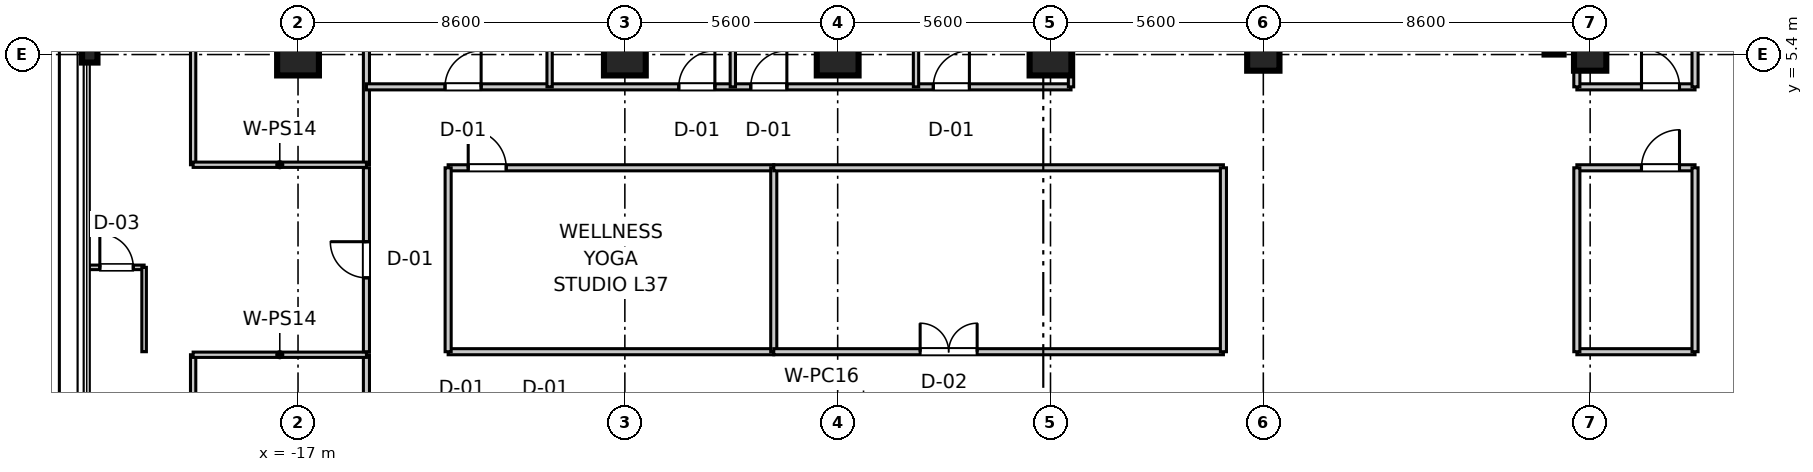
"""IFC4 building model, lengths in metres.
Left out: names, types, materials, properties, quantities, classifications, styles, units other than length and angle.
Written with IfcOpenShell. Run it as: python <this file> out.ifc"""

import sys

from ifc_helpers import new_model, si_unit, direction, frame, frame_2d, origin, origin_2d, place, context, subcontext, project, spatial, rectangle, i_section, extrude, source, transform, mapped, element, fill, save


model = new_model("IFC4")
c1 = context("Model", 3, precision=1e-05, world=origin(), true_north=direction((0.0, 1.0)))
c2 = subcontext(c1, "Body", "Model", "MODEL_VIEW")
j1 = project(units=[si_unit("LENGTHUNIT", "METRE"), si_unit("PLANEANGLEUNIT", "RADIAN")], contexts=[c1])
p1 = place(None, origin())
s1 = spatial("IfcSite", under=j1, at=p1, CompositionType="ELEMENT")
p2 = place(p1, origin())
s2 = spatial("IfcBuilding", under=s1, at=p2, CompositionType="ELEMENT")
p3 = place(p2, frame((0.0, 0.0, 149.0)))
s3 = spatial("IfcBuildingStorey", under=s2, at=p3, CompositionType="ELEMENT", Elevation=149.0)
m1 = source(origin(), c2, "Body", "SweptSolid", [
    extrude(rectangle(XDim=1.1, YDim=1.1, at=origin_2d()), origin(), (0.0, 0.0, 1.0), 3.605),
])
for number, where, z_axis, x_axis in (
    (1, (-17.0, 5.4, 0.0), (0.0, 0.0, 1.0), (1.0, 0.0, 0.0)),
    (2, (-8.4, 5.4, 0.0), (0.0, 0.0, 1.0), (1.0, 0.0, 0.0)),
    (3, (-2.8, 5.4, 0.0), (0.0, 0.0, 1.0), (1.0, 0.0, 0.0)),
    (4, (2.8, 5.4, 0.0), (0.0, 0.0, 1.0), (1.0, 0.0, 0.0)),
):
    element("IfcColumn", number, at=place(p3, frame(where, z_axis=z_axis, x_axis=x_axis)), inside=s3, PredefinedType="COLUMN", context=c2, shape_type="MappedRepresentation", body=[
        mapped(m1, transform((0.0, 0.0, 0.0), scale=1.0)),
    ])
m2 = source(origin(), c2, "Body", "SweptSolid", [
    extrude(rectangle(XDim=0.85, YDim=0.85, at=origin_2d()), origin(), (0.0, 0.0, 1.0), 3.605),
])
for number, where, z_axis, x_axis in (
    (5, (8.4, 5.4, 0.0), (0.0, 0.0, 1.0), (1.0, 0.0, 0.0)),
    (6, (17.0, 5.4, 0.0), (0.0, 0.0, 1.0), (1.0, 0.0, 0.0)),
):
    element("IfcColumn", number, at=place(p3, frame(where, z_axis=z_axis, x_axis=x_axis)), inside=s3, PredefinedType="PILASTER", context=c2, shape_type="MappedRepresentation", body=[
        mapped(m2, transform((0.0, 0.0, 0.0), scale=1.0)),
    ])
m3 = source(origin(), c2, "Body", "SweptSolid", [
    extrude(i_section(OverallWidth=0.406, OverallDepth=0.422, WebThickness=0.019, FlangeThickness=0.03, at=origin_2d()), origin(), (0.0, 0.0, 1.0), 3.605),
])
p4 = place(p3, frame((-22.48, 5.4, 0.0), z_axis=(0.0, 0.0, 1.0), x_axis=(1.0, 0.0, 0.0)))
e7 = element("IfcColumn", 7, at=p4, inside=s3, PredefinedType="COLUMN", context=c2, shape_type="MappedRepresentation", body=[
    mapped(m3, transform((0.0, 0.0, 0.0), scale=1.0)),
])
m4 = source(origin(), c2, "Body", "SweptSolid", [
    extrude(rectangle(XDim=11.6, YDim=0.5, at=frame_2d((5.8, 0.0))), origin(), (0.0, 0.0, 1.0), 3.39),
])
p5 = place(p3, frame((16.05, 5.4, 0.0), z_axis=(0.0, 0.0, 1.0), x_axis=(0.0, 1.0, 0.0)))
e8 = element("IfcWall", 8, at=p5, inside=s3, PredefinedType="SHEAR", context=c2, shape_type="MappedRepresentation", body=[
    mapped(m4, transform((0.0, 0.0, 0.0), scale=1.0)),
])
m5 = source(origin(), c2, "Body", "SweptSolid", [
    extrude(rectangle(XDim=3.11, YDim=0.16, at=frame_2d((1.555, 0.0))), origin(), (0.0, 0.0, 1.0), 2.73),
])
p6 = place(p3, frame((16.65, 4.55, 0.0), z_axis=(0.0, 0.0, 1.0), x_axis=(1.0, 0.0, 0.0)))
e9 = element("IfcWall", 9, at=p6, inside=s3, PredefinedType="PARTITIONING", context=c2, shape_type="MappedRepresentation", body=[
    mapped(m5, transform((0.0, 0.0, 0.0), scale=1.0)),
])
p7 = place(p6, frame((1.701, 0.0, 0.0)))
e10 = element("IfcOpeningElement", 10, at=p7, cuts=e9, PredefinedType="OPENING", context=c2, shape_type="SweptSolid", body=[
    extrude(rectangle(XDim=1.0, YDim=2.1, at=frame_2d((0.5, 1.05))), frame((0.0, 0.09, 0.0), z_axis=(0.0, -1.0, 0.0), x_axis=(1.0, 0.0, 0.0)), (0.0, 0.0, 1.0), 0.18),
])
m6 = source(origin(), c2, "Body", "SweptSolid", [
    extrude(rectangle(XDim=17.95, YDim=0.16, at=frame_2d((8.975, 0.0))), origin(), (0.0, 0.0, 1.0), 2.73),
])
p8 = place(p3, frame((16.65, 4.55, 0.0), z_axis=(0.0, 0.0, 1.0), x_axis=(0.0, 1.0, 0.0)))
e11 = element("IfcWall", 11, at=p8, inside=s3, PredefinedType="PARTITIONING", context=c2, shape_type="MappedRepresentation", body=[
    mapped(m6, transform((0.0, 0.0, 0.0), scale=1.0)),
])
m7 = source(origin(), c2, "Body", "SweptSolid", [
    extrude(rectangle(XDim=16.53, YDim=0.16, at=frame_2d((8.265, 0.0))), origin(), (0.0, 0.0, 1.0), 2.73),
])
p9 = place(p3, frame((19.76, 4.55, 0.0), z_axis=(0.0, 0.0, 1.0), x_axis=(0.0, 1.0, 0.0)))
e12 = element("IfcWall", 12, at=p9, inside=s3, PredefinedType="PARTITIONING", context=c2, shape_type="MappedRepresentation", body=[
    mapped(m7, transform((0.0, 0.0, 0.0), scale=1.0)),
])
m8 = source(origin(), c2, "Body", "SweptSolid", [
    extrude(rectangle(XDim=20.0, YDim=0.16, at=frame_2d((10.0, 0.0))), origin(), (0.0, 0.0, 1.0), 2.73),
])
p10 = place(p3, frame((-15.2, 2.5, 0.0), z_axis=(0.0, 0.0, 1.0), x_axis=(0.0, 1.0, 0.0)))
e13 = element("IfcWall", 13, at=p10, inside=s3, PredefinedType="PARTITIONING", context=c2, shape_type="MappedRepresentation", body=[
    mapped(m8, transform((0.0, 0.0, 0.0), scale=1.0)),
])
p11 = place(p10, frame((8.265, 0.0, 0.0)))
e14 = element("IfcOpeningElement", 14, at=p11, cuts=e13, PredefinedType="OPENING", context=c2, shape_type="SweptSolid", body=[
    extrude(rectangle(XDim=0.95, YDim=2.1, at=frame_2d((0.475, 1.05))), frame((0.0, 0.09, 0.0), z_axis=(0.0, -1.0, 0.0), x_axis=(1.0, 0.0, 0.0)), (0.0, 0.0, 1.0), 0.18),
])
m9 = source(origin(), c2, "Body", "SweptSolid", [
    extrude(rectangle(XDim=18.58, YDim=0.14, at=frame_2d((9.29, 0.0))), origin(), (0.0, 0.0, 1.0), 2.73),
])
p12 = place(p3, frame((-19.76, 2.5, 0.0), z_axis=(0.0, 0.0, 1.0), x_axis=(0.0, 1.0, 0.0)))
e15 = element("IfcWall", 15, at=p12, inside=s3, PredefinedType="PARTITIONING", context=c2, shape_type="MappedRepresentation", body=[
    mapped(m9, transform((0.0, 0.0, 0.0), scale=1.0)),
])
m10 = source(origin(), c2, "Body", "SweptSolid", [
    extrude(rectangle(XDim=4.56, YDim=0.14, at=frame_2d((2.28, 0.0))), origin(), (0.0, 0.0, 1.0), 2.73),
])
p13 = place(p3, frame((-19.76, 2.5, 0.0), z_axis=(0.0, 0.0, 1.0), x_axis=(1.0, 0.0, 0.0)))
e16 = element("IfcWall", 16, at=p13, inside=s3, PredefinedType="PARTITIONING", context=c2, shape_type="MappedRepresentation", body=[
    mapped(m10, transform((0.0, 0.0, 0.0), scale=1.0)),
])
m11 = source(origin(), c2, "Body", "SweptSolid", [
    extrude(rectangle(XDim=18.54, YDim=0.16, at=frame_2d((9.27, 0.0))), origin(), (0.0, 0.0, 1.0), 2.73),
])
p14 = place(p3, frame((-15.2, 4.55, 0.0), z_axis=(0.0, 0.0, 1.0), x_axis=(1.0, 0.0, 0.0)))
e17 = element("IfcWall", 17, at=p14, inside=s3, PredefinedType="PARTITIONING", context=c2, shape_type="MappedRepresentation", body=[
    mapped(m11, transform((0.0, 0.0, 0.0), scale=1.0)),
])
p15 = place(p14, frame((2.068, 0.0, 0.0)))
e18 = element("IfcOpeningElement", 18, at=p15, cuts=e17, PredefinedType="OPENING", context=c2, shape_type="SweptSolid", body=[
    extrude(rectangle(XDim=0.95, YDim=2.1, at=frame_2d((0.475, 1.05))), frame((0.0, 0.09, 0.0), z_axis=(0.0, -1.0, 0.0), x_axis=(1.0, 0.0, 0.0)), (0.0, 0.0, 1.0), 0.18),
])
p16 = place(p14, frame((8.219, 0.0, 0.0)))
e19 = element("IfcOpeningElement", 19, at=p16, cuts=e17, PredefinedType="OPENING", context=c2, shape_type="SweptSolid", body=[
    extrude(rectangle(XDim=0.95, YDim=2.1, at=frame_2d((0.475, 1.05))), frame((0.0, 0.09, 0.0), z_axis=(0.0, -1.0, 0.0), x_axis=(1.0, 0.0, 0.0)), (0.0, 0.0, 1.0), 0.18),
])
p17 = place(p14, frame((10.113, 0.0, 0.0)))
e20 = element("IfcOpeningElement", 20, at=p17, cuts=e17, PredefinedType="OPENING", context=c2, shape_type="SweptSolid", body=[
    extrude(rectangle(XDim=0.95, YDim=2.1, at=frame_2d((0.475, 1.05))), frame((0.0, 0.09, 0.0), z_axis=(0.0, -1.0, 0.0), x_axis=(1.0, 0.0, 0.0)), (0.0, 0.0, 1.0), 0.18),
])
p18 = place(p14, frame((14.916, 0.0, 0.0)))
e21 = element("IfcOpeningElement", 21, at=p18, cuts=e17, PredefinedType="OPENING", context=c2, shape_type="SweptSolid", body=[
    extrude(rectangle(XDim=0.95, YDim=2.1, at=frame_2d((0.475, 1.05))), frame((0.0, 0.09, 0.0), z_axis=(0.0, -1.0, 0.0), x_axis=(1.0, 0.0, 0.0)), (0.0, 0.0, 1.0), 0.18),
])
m12 = source(origin(), c2, "Body", "SweptSolid", [
    extrude(rectangle(XDim=17.95, YDim=0.14, at=frame_2d((8.975, 0.0))), origin(), (0.0, 0.0, 1.0), 2.73),
])
for number, where, z_axis, x_axis in (
    (22, (3.34, 4.55, 0.0), (0.0, 0.0, 1.0), (0.0, 1.0, 0.0)),
    (23, (-10.38, 4.55, 0.0), (0.0, 0.0, 1.0), (0.0, 1.0, 0.0)),
    (24, (-5.559, 4.55, 0.0), (0.0, 0.0, 1.0), (0.0, 1.0, 0.0)),
    (25, (-0.739, 4.55, 0.0), (0.0, 0.0, 1.0), (0.0, 1.0, 0.0)),
):
    element("IfcWall", number, at=place(p3, frame(where, z_axis=z_axis, x_axis=x_axis)), inside=s3, PredefinedType="PARTITIONING", context=c2, shape_type="MappedRepresentation", body=[
        mapped(m12, transform((0.0, 0.0, 0.0), scale=1.0)),
    ])
p19 = place(p3, frame((-15.2, -22.5, 0.0), z_axis=(0.0, 0.0, 1.0), x_axis=(0.0, 1.0, 0.0)))
e26 = element("IfcWall", 26, at=p19, inside=s3, PredefinedType="PARTITIONING", context=c2, shape_type="MappedRepresentation", body=[
    mapped(m8, transform((0.0, 0.0, 0.0), scale=1.0)),
])
p20 = place(p19, frame((10.785, 0.0, 0.0)))
e27 = element("IfcOpeningElement", 27, at=p20, cuts=e26, PredefinedType="OPENING", context=c2, shape_type="SweptSolid", body=[
    extrude(rectangle(XDim=0.95, YDim=2.1, at=frame_2d((0.475, 1.05))), frame((0.0, 0.09, 0.0), z_axis=(0.0, -1.0, 0.0), x_axis=(1.0, 0.0, 0.0)), (0.0, 0.0, 1.0), 0.18),
])
p21 = place(p3, frame((-19.76, -21.08, 0.0), z_axis=(0.0, 0.0, 1.0), x_axis=(0.0, 1.0, 0.0)))
e28 = element("IfcWall", 28, at=p21, inside=s3, PredefinedType="PARTITIONING", context=c2, shape_type="MappedRepresentation", body=[
    mapped(m9, transform((0.0, 0.0, 0.0), scale=1.0)),
])
p22 = place(p3, frame((-19.76, -2.5, 0.0), z_axis=(0.0, 0.0, 1.0), x_axis=(1.0, 0.0, 0.0)))
e29 = element("IfcWall", 29, at=p22, inside=s3, PredefinedType="PARTITIONING", context=c2, shape_type="MappedRepresentation", body=[
    mapped(m10, transform((0.0, 0.0, 0.0), scale=1.0)),
])
m13 = source(origin(), c2, "Body", "SweptSolid", [
    extrude(rectangle(XDim=4.84, YDim=0.16, at=frame_2d((2.42, 0.0))), origin(), (0.0, 0.0, 1.0), 2.73),
])
p23 = place(p3, frame((-15.2, -2.42, 0.0), z_axis=(0.0, 0.0, 1.0), x_axis=(0.0, 1.0, 0.0)))
e30 = element("IfcWall", 30, at=p23, inside=s3, PredefinedType="PARTITIONING", context=c2, shape_type="MappedRepresentation", body=[
    mapped(m13, transform((0.0, 0.0, 0.0), scale=1.0)),
])
p24 = place(p23, frame((1.945, 0.0, 0.0)))
e31 = element("IfcOpeningElement", 31, at=p24, cuts=e30, PredefinedType="OPENING", context=c2, shape_type="SweptSolid", body=[
    extrude(rectangle(XDim=0.95, YDim=2.1, at=frame_2d((0.475, 1.05))), frame((0.0, 0.09, 0.0), z_axis=(0.0, -1.0, 0.0), x_axis=(1.0, 0.0, 0.0)), (0.0, 0.0, 1.0), 0.18),
])
m14 = source(origin(), c2, "Body", "SweptSolid", [
    extrude(rectangle(XDim=1.45, YDim=0.12, at=frame_2d((0.725, 0.0))), origin(), (0.0, 0.0, 1.0), 2.73),
])
p25 = place(p3, frame((-22.5, -0.2, 0.0), z_axis=(0.0, 0.0, 1.0), x_axis=(1.0, 0.0, 0.0)))
e32 = element("IfcWall", 32, at=p25, inside=s3, PredefinedType="PARTITIONING", context=c2, shape_type="MappedRepresentation", body=[
    mapped(m14, transform((0.0, 0.0, 0.0), scale=1.0)),
])
p26 = place(p25, frame((0.285, 0.0, 0.0)))
e33 = element("IfcOpeningElement", 33, at=p26, cuts=e32, PredefinedType="OPENING", context=c2, shape_type="SweptSolid", body=[
    extrude(rectangle(XDim=0.88, YDim=2.1, at=frame_2d((0.44, 1.05))), frame((0.0, 0.07, 0.0), z_axis=(0.0, -1.0, 0.0), x_axis=(1.0, 0.0, 0.0)), (0.0, 0.0, 1.0), 0.14),
])
m15 = source(origin(), c2, "Body", "SweptSolid", [
    extrude(rectangle(XDim=2.22, YDim=0.12, at=frame_2d((1.11, 0.0))), origin(), (0.0, 0.0, 1.0), 2.73),
])
p27 = place(p3, frame((-21.05, -2.42, 0.0), z_axis=(0.0, 0.0, 1.0), x_axis=(0.0, 1.0, 0.0)))
e34 = element("IfcWall", 34, at=p27, inside=s3, PredefinedType="PARTITIONING", context=c2, shape_type="MappedRepresentation", body=[
    mapped(m15, transform((0.0, 0.0, 0.0), scale=1.0)),
])
m16 = source(origin(), c2, "Body", "SweptSolid", [
    extrude(rectangle(XDim=8.568, YDim=0.16, at=frame_2d((4.284, 0.0))), origin(), (0.0, 0.0, 1.0), 2.73),
])
p28 = place(p3, frame((-13.05, -2.42, 0.0), z_axis=(0.0, 0.0, 1.0), x_axis=(1.0, 0.0, 0.0)))
e35 = element("IfcWall", 35, at=p28, inside=s3, PredefinedType="PARTITIONING", context=c2, shape_type="MappedRepresentation", body=[
    mapped(m16, transform((0.0, 0.0, 0.0), scale=1.0)),
])
p29 = place(p3, frame((-13.05, 2.42, 0.0), z_axis=(0.0, 0.0, 1.0), x_axis=(1.0, 0.0, 0.0)))
e36 = element("IfcWall", 36, at=p29, inside=s3, PredefinedType="PARTITIONING", context=c2, shape_type="MappedRepresentation", body=[
    mapped(m16, transform((0.0, 0.0, 0.0), scale=1.0)),
])
p30 = place(p29, frame((0.528, 0.0, 0.0)))
e37 = element("IfcOpeningElement", 37, at=p30, cuts=e36, PredefinedType="OPENING", context=c2, shape_type="SweptSolid", body=[
    extrude(rectangle(XDim=1.0, YDim=2.1, at=frame_2d((0.5, 1.05))), frame((0.0, 0.09, 0.0), z_axis=(0.0, -1.0, 0.0), x_axis=(1.0, 0.0, 0.0)), (0.0, 0.0, 1.0), 0.18),
])
for number, where, z_axis, x_axis in (
    (38, (-13.05, -2.42, 0.0), (0.0, 0.0, 1.0), (0.0, 1.0, 0.0)),
    (39, (-4.482, -2.42, 0.0), (0.0, 0.0, 1.0), (0.0, 1.0, 0.0)),
):
    element("IfcWall", number, at=place(p3, frame(where, z_axis=z_axis, x_axis=x_axis)), inside=s3, PredefinedType="PARTITIONING", context=c2, shape_type="MappedRepresentation", body=[
        mapped(m13, transform((0.0, 0.0, 0.0), scale=1.0)),
    ])
m17 = source(origin(), c2, "Body", "SweptSolid", [
    extrude(rectangle(XDim=11.832, YDim=0.16, at=frame_2d((5.916, 0.0))), origin(), (0.0, 0.0, 1.0), 2.73),
])
p31 = place(p3, frame((-4.482, -2.42, 0.0), z_axis=(0.0, 0.0, 1.0), x_axis=(1.0, 0.0, 0.0)))
e40 = element("IfcWall", 40, at=p31, inside=s3, PredefinedType="PARTITIONING", context=c2, shape_type="MappedRepresentation", body=[
    mapped(m17, transform((0.0, 0.0, 0.0), scale=1.0)),
])
p32 = place(p31, frame((3.852, 0.0, 0.0)))
e41 = element("IfcOpeningElement", 41, at=p32, cuts=e40, PredefinedType="OPENING", context=c2, shape_type="SweptSolid", body=[
    extrude(rectangle(XDim=1.5, YDim=2.15, at=frame_2d((0.75, 1.075))), frame((0.0, 0.09, 0.0), z_axis=(0.0, -1.0, 0.0), x_axis=(1.0, 0.0, 0.0)), (0.0, 0.0, 1.0), 0.18),
])
p33 = place(p3, frame((-4.482, 2.42, 0.0), z_axis=(0.0, 0.0, 1.0), x_axis=(1.0, 0.0, 0.0)))
e42 = element("IfcWall", 42, at=p33, inside=s3, PredefinedType="PARTITIONING", context=c2, shape_type="MappedRepresentation", body=[
    mapped(m17, transform((0.0, 0.0, 0.0), scale=1.0)),
])
p34 = place(p3, frame((7.35, -2.42, 0.0), z_axis=(0.0, 0.0, 1.0), x_axis=(0.0, 1.0, 0.0)))
e43 = element("IfcWall", 43, at=p34, inside=s3, PredefinedType="PARTITIONING", context=c2, shape_type="MappedRepresentation", body=[
    mapped(m13, transform((0.0, 0.0, 0.0), scale=1.0)),
])
p35 = place(p3, frame((16.65, -2.42, 0.0), z_axis=(0.0, 0.0, 1.0), x_axis=(1.0, 0.0, 0.0)))
e44 = element("IfcWall", 44, at=p35, inside=s3, PredefinedType="PARTITIONING", context=c2, shape_type="MappedRepresentation", body=[
    mapped(m5, transform((0.0, 0.0, 0.0), scale=1.0)),
])
p36 = place(p3, frame((16.65, 2.42, 0.0), z_axis=(0.0, 0.0, 1.0), x_axis=(1.0, 0.0, 0.0)))
e45 = element("IfcWall", 45, at=p36, inside=s3, PredefinedType="PARTITIONING", context=c2, shape_type="MappedRepresentation", body=[
    mapped(m5, transform((0.0, 0.0, 0.0), scale=1.0)),
])
p37 = place(p36, frame((1.701, 0.0, 0.0)))
e46 = element("IfcOpeningElement", 46, at=p37, cuts=e45, PredefinedType="OPENING", context=c2, shape_type="SweptSolid", body=[
    extrude(rectangle(XDim=1.0, YDim=2.1, at=frame_2d((0.5, 1.05))), frame((0.0, 0.09, 0.0), z_axis=(0.0, -1.0, 0.0), x_axis=(1.0, 0.0, 0.0)), (0.0, 0.0, 1.0), 0.18),
])
for number, where, z_axis, x_axis in (
    (47, (16.65, -2.42, 0.0), (0.0, 0.0, 1.0), (0.0, 1.0, 0.0)),
    (48, (19.76, -2.42, 0.0), (0.0, 0.0, 1.0), (0.0, 1.0, 0.0)),
):
    element("IfcWall", number, at=place(p3, frame(where, z_axis=z_axis, x_axis=x_axis)), inside=s3, PredefinedType="PARTITIONING", context=c2, shape_type="MappedRepresentation", body=[
        mapped(m13, transform((0.0, 0.0, 0.0), scale=1.0)),
    ])
m18 = source(origin(), c2, "Body", "SweptSolid", [
    extrude(rectangle(XDim=1.0, YDim=2.1, at=frame_2d((0.5, 1.05))), frame((0.0, 0.025, 0.0), z_axis=(0.0, -1.0, 0.0), x_axis=(1.0, 0.0, 0.0)), (0.0, 0.0, 1.0), 0.05),
])
p38 = place(p7, origin())
e49 = element("IfcDoor", 49, at=p38, inside=s3, OperationType="SINGLE_SWING_LEFT", PredefinedType="DOOR", context=c2, shape_type="MappedRepresentation", body=[
    mapped(m18, transform((0.0, 0.0, 0.0), scale=1.0)),
])
fill(e10, e49)
m19 = source(origin(), c2, "Body", "SweptSolid", [
    extrude(rectangle(XDim=0.95, YDim=2.1, at=frame_2d((0.475, 1.05))), frame((0.0, 0.025, 0.0), z_axis=(0.0, -1.0, 0.0), x_axis=(1.0, 0.0, 0.0)), (0.0, 0.0, 1.0), 0.05),
])
p39 = place(p15, origin())
e50 = element("IfcDoor", 50, at=p39, inside=s3, OperationType="SINGLE_SWING_RIGHT", PredefinedType="DOOR", context=c2, shape_type="MappedRepresentation", body=[
    mapped(m19, transform((0.0, 0.0, 0.0), scale=1.0)),
])
fill(e18, e50)
p40 = place(p16, origin())
e51 = element("IfcDoor", 51, at=p40, inside=s3, OperationType="SINGLE_SWING_RIGHT", PredefinedType="DOOR", context=c2, shape_type="MappedRepresentation", body=[
    mapped(m19, transform((0.0, 0.0, 0.0), scale=1.0)),
])
fill(e19, e51)
p41 = place(p17, origin())
e52 = element("IfcDoor", 52, at=p41, inside=s3, OperationType="SINGLE_SWING_RIGHT", PredefinedType="DOOR", context=c2, shape_type="MappedRepresentation", body=[
    mapped(m19, transform((0.0, 0.0, 0.0), scale=1.0)),
])
fill(e20, e52)
p42 = place(p18, origin())
e53 = element("IfcDoor", 53, at=p42, inside=s3, OperationType="SINGLE_SWING_RIGHT", PredefinedType="DOOR", context=c2, shape_type="MappedRepresentation", body=[
    mapped(m19, transform((0.0, 0.0, 0.0), scale=1.0)),
])
fill(e21, e53)
m20 = source(origin(), c2, "Body", "SweptSolid", [
    extrude(rectangle(XDim=0.88, YDim=2.1, at=frame_2d((0.44, 1.05))), frame((0.0, 0.025, 0.0), z_axis=(0.0, -1.0, 0.0), x_axis=(1.0, 0.0, 0.0)), (0.0, 0.0, 1.0), 0.05),
])
p43 = place(p26, frame((0.88, 0.0, 0.0), z_axis=(0.0, 0.0, 1.0), x_axis=(-1.0, 0.0, 0.0)))
e54 = element("IfcDoor", 54, at=p43, inside=s3, OperationType="SINGLE_SWING_LEFT", PredefinedType="DOOR", context=c2, shape_type="MappedRepresentation", body=[
    mapped(m20, transform((0.0, 0.0, 0.0), scale=1.0)),
])
fill(e33, e54)
p44 = place(p24, origin())
e55 = element("IfcDoor", 55, at=p44, inside=s3, OperationType="SINGLE_SWING_RIGHT", PredefinedType="DOOR", context=c2, shape_type="MappedRepresentation", body=[
    mapped(m19, transform((0.0, 0.0, 0.0), scale=1.0)),
])
fill(e31, e55)
p45 = place(p30, frame((1.0, 0.0, 0.0), z_axis=(0.0, 0.0, 1.0), x_axis=(-1.0, 0.0, 0.0)))
e56 = element("IfcDoor", 56, at=p45, inside=s3, OperationType="SINGLE_SWING_LEFT", PredefinedType="DOOR", context=c2, shape_type="MappedRepresentation", body=[
    mapped(m18, transform((0.0, 0.0, 0.0), scale=1.0)),
])
fill(e37, e56)
m21 = source(origin(), c2, "Body", "SweptSolid", [
    extrude(rectangle(XDim=1.5, YDim=2.15, at=frame_2d((0.75, 1.075))), frame((0.0, 0.025, 0.0), z_axis=(0.0, -1.0, 0.0), x_axis=(1.0, 0.0, 0.0)), (0.0, 0.0, 1.0), 0.05),
])
p46 = place(p32, origin())
e57 = element("IfcDoor", 57, at=p46, inside=s3, OperationType="DOUBLE_DOOR_SINGLE_SWING", PredefinedType="DOOR", context=c2, shape_type="MappedRepresentation", body=[
    mapped(m21, transform((0.0, 0.0, 0.0), scale=1.0)),
])
fill(e41, e57)
p47 = place(p37, frame((1.0, 0.0, 0.0), z_axis=(0.0, 0.0, 1.0), x_axis=(-1.0, 0.0, 0.0)))
e58 = element("IfcDoor", 58, at=p47, inside=s3, OperationType="SINGLE_SWING_RIGHT", PredefinedType="DOOR", context=c2, shape_type="MappedRepresentation", body=[
    mapped(m18, transform((0.0, 0.0, 0.0), scale=1.0)),
])
fill(e46, e58)
save(model, sys.argv[1])
